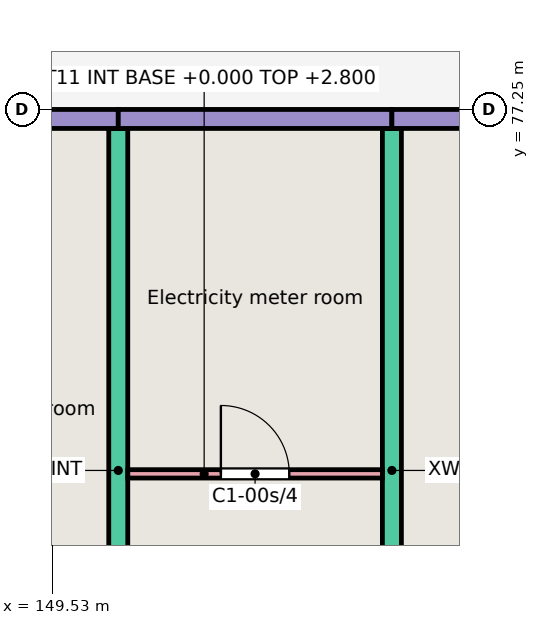
"""IFC4 building model, lengths in metres.
Left out: names, types, materials, properties, quantities, classifications, styles, units other than length and angle.
Written with IfcOpenShell. Run it as: python <this file> out.ifc"""

import sys

from ifc_helpers import new_model, si_unit, direction, frame, frame_2d, origin, place, context, subcontext, project, spatial, rectangle, extrude, element, fill, save


model = new_model("IFC4")
c1 = context("Model", 3, precision=1e-05, world=origin(), true_north=direction((0.0, 1.0)))
c2 = subcontext(c1, "Body", "Model", "MODEL_VIEW")
j1 = project(units=[si_unit("LENGTHUNIT", "METRE"), si_unit("PLANEANGLEUNIT", "RADIAN")], contexts=[c1])
p1 = place(None, origin())
s1 = spatial("IfcSite", under=j1, at=p1, CompositionType="ELEMENT")
p2 = place(p1, origin())
s2 = spatial("IfcBuilding", under=s1, at=p2, CompositionType="ELEMENT")
p3 = place(p2, origin())
s3 = spatial("IfcBuildingStorey", under=s2, at=p3, CompositionType="ELEMENT", Elevation=0.0)
for number, where, z_axis, x_axis in (
    (1, (150.4, 68.0, -0.25), (0.0, 0.0, 1.0), (0.0, 1.0, 0.0)),
    (2, (154.0, 68.0, -0.25), (0.0, 0.0, 1.0), (0.0, 1.0, 0.0)),
):
    element("IfcWall", number, at=place(p3, frame(where, z_axis=z_axis, x_axis=x_axis)), inside=s3, PredefinedType="SHEAR", context=c2, shape_type="SweptSolid", body=[
        extrude(rectangle(XDim=9.0, YDim=0.25, at=frame_2d((4.5, 0.0))), origin(), (0.0, 0.0, 1.0), 3.25),
    ])
p4 = place(p3, frame((146.65, 77.125, -0.25), z_axis=(0.0, 0.0, 1.0), x_axis=(1.0, 0.0, 0.0)))
e3 = element("IfcWall", 3, at=p4, inside=s3, PredefinedType="SOLIDWALL", context=c2, shape_type="SweptSolid", body=[
    extrude(rectangle(XDim=3.75, YDim=0.25, at=frame_2d((1.875, 0.0))), origin(), (0.0, 0.0, 1.0), 3.25),
])
p5 = place(p4, frame((1.462, 0.0, 0.25)))
e4 = element("IfcOpeningElement", 4, at=p5, cuts=e3, PredefinedType="OPENING", context=c2, shape_type="SweptSolid", body=[
    extrude(rectangle(XDim=1.0, YDim=2.1, at=frame_2d((0.5, 1.05))), frame((0.0, 0.135, 0.0), z_axis=(0.0, -1.0, 0.0), x_axis=(1.0, 0.0, 0.0)), (0.0, 0.0, 1.0), 0.27),
])
p6 = place(p3, frame((150.4, 77.125, -0.25), z_axis=(0.0, 0.0, 1.0), x_axis=(1.0, 0.0, 0.0)))
e5 = element("IfcWall", 5, at=p6, inside=s3, PredefinedType="SOLIDWALL", context=c2, shape_type="SweptSolid", body=[
    extrude(rectangle(XDim=3.6, YDim=0.25, at=frame_2d((1.8, 0.0))), origin(), (0.0, 0.0, 1.0), 3.25),
])
p7 = place(p3, frame((154.0, 77.125, -0.25), z_axis=(0.0, 0.0, 1.0), x_axis=(1.0, 0.0, 0.0)))
e6 = element("IfcWall", 6, at=p7, inside=s3, PredefinedType="SOLIDWALL", context=c2, shape_type="SweptSolid", body=[
    extrude(rectangle(XDim=3.6, YDim=0.25, at=frame_2d((1.8, 0.0))), origin(), (0.0, 0.0, 1.0), 3.25),
])
p8 = place(p7, frame((1.3, 0.0, 0.25)))
e7 = element("IfcOpeningElement", 7, at=p8, cuts=e6, PredefinedType="OPENING", context=c2, shape_type="SweptSolid", body=[
    extrude(rectangle(XDim=1.0, YDim=2.1, at=frame_2d((0.5, 1.05))), frame((0.0, 0.135, 0.0), z_axis=(0.0, -1.0, 0.0), x_axis=(1.0, 0.0, 0.0)), (0.0, 0.0, 1.0), 0.27),
])
p9 = place(p3, frame((150.525, 72.455, 0.0), z_axis=(0.0, 0.0, 1.0), x_axis=(1.0, 0.0, 0.0)))
e8 = element("IfcWall", 8, at=p9, inside=s3, PredefinedType="PARTITIONING", context=c2, shape_type="SweptSolid", body=[
    extrude(rectangle(XDim=3.35, YDim=0.11, at=frame_2d((1.675, 0.0))), origin(), (0.0, 0.0, 1.0), 2.8),
])
p10 = place(p9, frame((1.225, 0.0, 0.0)))
e9 = element("IfcOpeningElement", 9, at=p10, cuts=e8, PredefinedType="OPENING", context=c2, shape_type="SweptSolid", body=[
    extrude(rectangle(XDim=0.9, YDim=2.1, at=frame_2d((0.45, 1.05))), frame((0.0, 0.065, 0.0), z_axis=(0.0, -1.0, 0.0), x_axis=(1.0, 0.0, 0.0)), (0.0, 0.0, 1.0), 0.13),
])
p11 = place(p10, origin())
e10 = element("IfcDoor", 10, at=p11, inside=s3, OperationType="SINGLE_SWING_LEFT", PredefinedType="DOOR", context=c2, shape_type="SweptSolid", body=[
    extrude(rectangle(XDim=0.9, YDim=2.1, at=frame_2d((0.45, 1.05))), frame((0.0, 0.025, 0.0), z_axis=(0.0, -1.0, 0.0), x_axis=(1.0, 0.0, 0.0)), (0.0, 0.0, 1.0), 0.05),
])
fill(e9, e10)
save(model, sys.argv[1])
